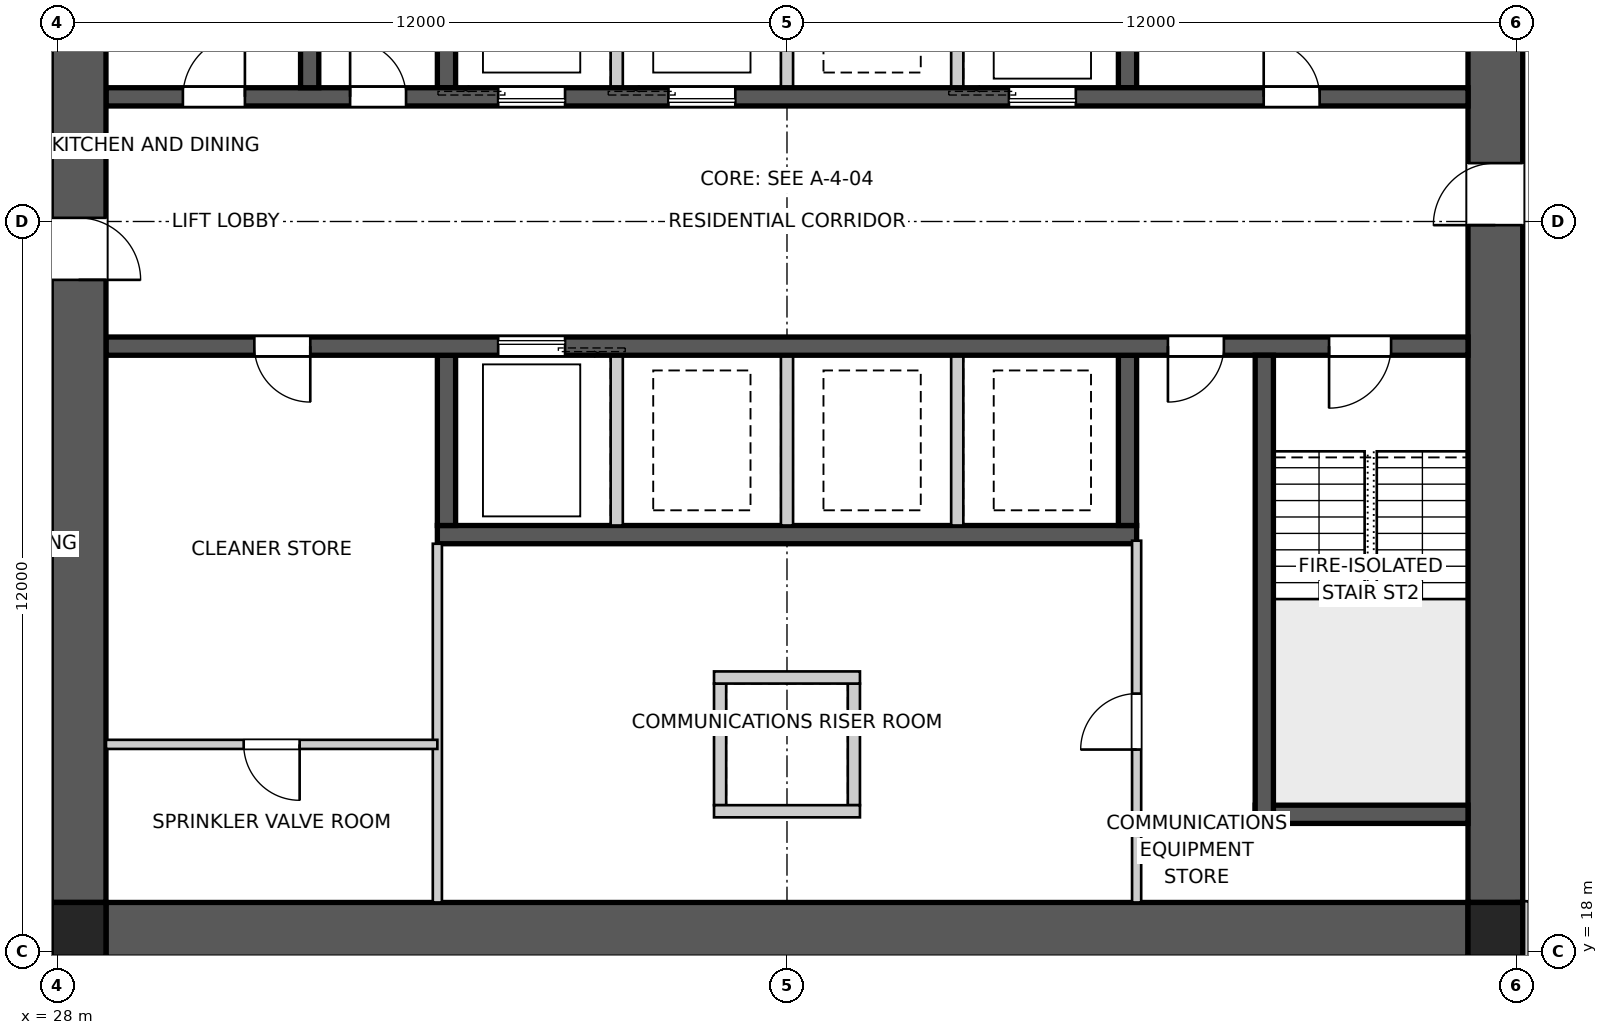
"""IFC4 building model, lengths in metres.
Left out: names, types, materials, properties, quantities, classifications, styles, units other than length and angle.
Written with IfcOpenShell. Run it as: python <this file> out.ifc"""

import sys

from ifc_helpers import new_model, si_unit, direction, frame, frame_2d, origin, origin_2d, place, context, subcontext, project, spatial, polyline, rectangle, outline, extrude, element, fill, save


model = new_model("IFC4")
c1 = context("Model", 3, precision=1e-05, world=origin(), true_north=direction((0.0, 1.0)))
c2 = subcontext(c1, "Body", "Model", "MODEL_VIEW")
j1 = project(units=[si_unit("LENGTHUNIT", "METRE"), si_unit("PLANEANGLEUNIT", "RADIAN")], contexts=[c1])
p1 = place(None, origin())
s1 = spatial("IfcSite", under=j1, at=p1, CompositionType="ELEMENT")
p2 = place(p1, origin())
s2 = spatial("IfcBuilding", under=s1, at=p2, CompositionType="ELEMENT")
p3 = place(p2, frame((0.0, 0.0, 32.0)))
s3 = spatial("IfcBuildingStorey", under=s2, at=p3, CompositionType="ELEMENT", Elevation=32.0)
p4 = place(p3, frame((51.2, 18.35, 0.0), z_axis=(0.0, 0.0, 1.0), x_axis=(-1.0, 0.0, 0.0)))
e1 = element("IfcWall", 1, at=p4, inside=s3, PredefinedType="SHEAR", context=c2, shape_type="SweptSolid", body=[
    extrude(outline(polyline([(0.0, -0.45), (22.4, -0.45), (22.4, -0.025), (22.85, -0.025), (22.85, 0.025), (22.4, 0.025), (22.4, 0.45), (0.0, 0.45), (0.0, 0.025), (-0.45, 0.025), (-0.45, -0.025), (0.0, -0.025), (0.0, -0.45)])), origin(), (0.0, 0.0, 1.0), 3.4),
])
p5 = place(p3, frame((51.65, 18.8, 0.0), z_axis=(0.0, 0.0, 1.0), x_axis=(0.0, 1.0, 0.0)))
e2 = element("IfcWall", 2, at=p5, inside=s3, PredefinedType="SHEAR", context=c2, shape_type="SweptSolid", body=[
    extrude(outline(polyline([(0.0, -0.45), (22.4, -0.45), (22.4, -0.025), (22.85, -0.025), (22.85, 0.025), (22.4, 0.025), (22.4, 0.45), (0.0, 0.45), (0.0, 0.025), (-0.45, 0.025), (-0.45, -0.025), (0.0, -0.025), (0.0, -0.45)])), origin(), (0.0, 0.0, 1.0), 3.4),
])
p6 = place(p5, frame((11.14, 0.0, 0.0)))
e3 = element("IfcOpeningElement", 3, at=p6, cuts=e2, PredefinedType="OPENING", context=c2, shape_type="SweptSolid", body=[
    extrude(rectangle(XDim=1.02, YDim=2.4, at=frame_2d((0.51, 1.2))), frame((0.0, 0.46, 0.0), z_axis=(0.0, -1.0, 0.0), x_axis=(1.0, 0.0, 0.0)), (0.0, 0.0, 1.0), 0.92),
])
p7 = place(p3, frame((28.35, 41.2, 0.0), z_axis=(0.0, 0.0, 1.0), x_axis=(0.0, -1.0, 0.0)))
e4 = element("IfcWall", 4, at=p7, inside=s3, PredefinedType="SHEAR", context=c2, shape_type="SweptSolid", body=[
    extrude(outline(polyline([(0.0, -0.45), (22.4, -0.45), (22.4, -0.025), (22.85, -0.025), (22.85, 0.025), (22.4, 0.025), (22.4, 0.45), (0.0, 0.45), (0.0, 0.025), (-0.45, 0.025), (-0.45, -0.025), (0.0, -0.025), (0.0, -0.45)])), origin(), (0.0, 0.0, 1.0), 3.4),
])
p8 = place(p7, frame((11.14, 0.0, 0.0)))
e5 = element("IfcOpeningElement", 5, at=p8, cuts=e4, PredefinedType="OPENING", context=c2, shape_type="SweptSolid", body=[
    extrude(rectangle(XDim=1.02, YDim=2.4, at=frame_2d((0.51, 1.2))), frame((0.0, 0.46, 0.0), z_axis=(0.0, -1.0, 0.0), x_axis=(1.0, 0.0, 0.0)), (0.0, 0.0, 1.0), 0.92),
])
p9 = place(p3, frame((28.8, 32.05, 0.0), z_axis=(0.0, 0.0, 1.0), x_axis=(1.0, 0.0, 0.0)))
e6 = element("IfcWall", 6, at=p9, inside=s3, PredefinedType="SHEAR", context=c2, shape_type="SweptSolid", body=[
    extrude(rectangle(XDim=22.4, YDim=0.3, at=frame_2d((11.2, 0.0))), origin(), (0.0, 0.0, 1.0), 3.4),
])
p10 = place(p9, frame((19.04, 0.0, 0.0)))
e7 = element("IfcOpeningElement", 7, at=p10, cuts=e6, PredefinedType="OPENING", context=c2, shape_type="SweptSolid", body=[
    extrude(rectangle(XDim=0.92, YDim=2.1, at=frame_2d((0.46, 1.05))), frame((0.0, 0.16, 0.0), z_axis=(0.0, -1.0, 0.0), x_axis=(1.0, 0.0, 0.0)), (0.0, 0.0, 1.0), 0.32),
])
p11 = place(p9, frame((1.265, 0.0, 0.0)))
e8 = element("IfcOpeningElement", 8, at=p11, cuts=e6, PredefinedType="OPENING", context=c2, shape_type="SweptSolid", body=[
    extrude(rectangle(XDim=1.02, YDim=2.1, at=frame_2d((0.51, 1.05))), frame((0.0, 0.16, 0.0), z_axis=(0.0, -1.0, 0.0), x_axis=(1.0, 0.0, 0.0)), (0.0, 0.0, 1.0), 0.32),
])
p12 = place(p9, frame((4.015, 0.0, 0.0)))
e9 = element("IfcOpeningElement", 9, at=p12, cuts=e6, PredefinedType="OPENING", context=c2, shape_type="SweptSolid", body=[
    extrude(rectangle(XDim=0.92, YDim=2.1, at=frame_2d((0.46, 1.05))), frame((0.0, 0.16, 0.0), z_axis=(0.0, -1.0, 0.0), x_axis=(1.0, 0.0, 0.0)), (0.0, 0.0, 1.0), 0.32),
])
p13 = place(p9, frame((6.45, 0.0, 0.0)))
e10 = element("IfcOpeningElement", 10, at=p13, cuts=e6, PredefinedType="OPENING", context=c2, shape_type="SweptSolid", body=[
    extrude(rectangle(XDim=1.1, YDim=2.1, at=frame_2d((0.55, 1.05))), frame((0.0, 0.16, 0.0), z_axis=(0.0, -1.0, 0.0), x_axis=(1.0, 0.0, 0.0)), (0.0, 0.0, 1.0), 0.32),
])
p14 = place(p9, frame((9.25, 0.0, 0.0)))
e11 = element("IfcOpeningElement", 11, at=p14, cuts=e6, PredefinedType="OPENING", context=c2, shape_type="SweptSolid", body=[
    extrude(rectangle(XDim=1.1, YDim=2.1, at=frame_2d((0.55, 1.05))), frame((0.0, 0.16, 0.0), z_axis=(0.0, -1.0, 0.0), x_axis=(1.0, 0.0, 0.0)), (0.0, 0.0, 1.0), 0.32),
])
p15 = place(p9, frame((14.85, 0.0, 0.0)))
e12 = element("IfcOpeningElement", 12, at=p15, cuts=e6, PredefinedType="OPENING", context=c2, shape_type="SweptSolid", body=[
    extrude(rectangle(XDim=1.1, YDim=2.1, at=frame_2d((0.55, 1.05))), frame((0.0, 0.16, 0.0), z_axis=(0.0, -1.0, 0.0), x_axis=(1.0, 0.0, 0.0)), (0.0, 0.0, 1.0), 0.32),
])
p16 = place(p3, frame((51.2, 27.95, 0.0), z_axis=(0.0, 0.0, 1.0), x_axis=(-1.0, 0.0, 0.0)))
e13 = element("IfcWall", 13, at=p16, inside=s3, PredefinedType="SHEAR", context=c2, shape_type="SweptSolid", body=[
    extrude(rectangle(XDim=22.4, YDim=0.3, at=frame_2d((11.2, 0.0))), origin(), (0.0, 0.0, 1.0), 3.4),
])
p17 = place(p16, frame((19.04, 0.0, 0.0)))
e14 = element("IfcOpeningElement", 14, at=p17, cuts=e13, PredefinedType="OPENING", context=c2, shape_type="SweptSolid", body=[
    extrude(rectangle(XDim=0.92, YDim=2.1, at=frame_2d((0.46, 1.05))), frame((0.0, 0.16, 0.0), z_axis=(0.0, -1.0, 0.0), x_axis=(1.0, 0.0, 0.0)), (0.0, 0.0, 1.0), 0.32),
])
p18 = place(p16, frame((1.265, 0.0, 0.0)))
e15 = element("IfcOpeningElement", 15, at=p18, cuts=e13, PredefinedType="OPENING", context=c2, shape_type="SweptSolid", body=[
    extrude(rectangle(XDim=1.02, YDim=2.1, at=frame_2d((0.51, 1.05))), frame((0.0, 0.16, 0.0), z_axis=(0.0, -1.0, 0.0), x_axis=(1.0, 0.0, 0.0)), (0.0, 0.0, 1.0), 0.32),
])
p19 = place(p16, frame((4.015, 0.0, 0.0)))
e16 = element("IfcOpeningElement", 16, at=p19, cuts=e13, PredefinedType="OPENING", context=c2, shape_type="SweptSolid", body=[
    extrude(rectangle(XDim=0.92, YDim=2.1, at=frame_2d((0.46, 1.05))), frame((0.0, 0.16, 0.0), z_axis=(0.0, -1.0, 0.0), x_axis=(1.0, 0.0, 0.0)), (0.0, 0.0, 1.0), 0.32),
])
p20 = place(p16, frame((14.85, 0.0, 0.0)))
e17 = element("IfcOpeningElement", 17, at=p20, cuts=e13, PredefinedType="OPENING", context=c2, shape_type="SweptSolid", body=[
    extrude(rectangle(XDim=1.1, YDim=2.1, at=frame_2d((0.55, 1.05))), frame((0.0, 0.16, 0.0), z_axis=(0.0, -1.0, 0.0), x_axis=(1.0, 0.0, 0.0)), (0.0, 0.0, 1.0), 0.32),
])
p21 = place(p3, frame((45.75, 24.85, 0.0), z_axis=(0.0, 0.0, 1.0), x_axis=(-1.0, 0.0, 0.0)))
e18 = element("IfcWall", 18, at=p21, inside=s3, PredefinedType="SHEAR", context=c2, shape_type="SweptSolid", body=[
    extrude(rectangle(XDim=11.5, YDim=0.3, at=frame_2d((5.75, 0.0))), origin(), (0.0, 0.0, 1.0), 3.4),
])
for number, where, z_axis, x_axis in (
    (19, (34.4, 32.2, 0.0), (0.0, 0.0, 1.0), (0.0, 1.0, 0.0)),
    (20, (45.6, 27.8, 0.0), (0.0, 0.0, 1.0), (0.0, -1.0, 0.0)),
):
    element("IfcWall", number, at=place(p3, frame(where, z_axis=z_axis, x_axis=x_axis)), inside=s3, PredefinedType="SHEAR", context=c2, shape_type="SweptSolid", body=[
        extrude(rectangle(XDim=2.8, YDim=0.3, at=frame_2d((1.4, 0.0))), origin(), (0.0, 0.0, 1.0), 3.4),
    ])
for number, where, z_axis, x_axis in (
    (21, (37.2, 32.2, 0.0), (0.0, 0.0, 1.0), (0.0, 1.0, 0.0)),
    (22, (42.8, 27.8, 0.0), (0.0, 0.0, 1.0), (0.0, -1.0, 0.0)),
    (23, (40.0, 32.2, 0.0), (0.0, 0.0, 1.0), (0.0, 1.0, 0.0)),
    (24, (40.0, 27.8, 0.0), (0.0, 0.0, 1.0), (0.0, -1.0, 0.0)),
    (25, (42.8, 32.2, 0.0), (0.0, 0.0, 1.0), (0.0, 1.0, 0.0)),
    (26, (37.2, 27.8, 0.0), (0.0, 0.0, 1.0), (0.0, -1.0, 0.0)),
):
    element("IfcWall", number, at=place(p3, frame(where, z_axis=z_axis, x_axis=x_axis)), inside=s3, PredefinedType="SOLIDWALL", context=c2, shape_type="SweptSolid", body=[
        extrude(rectangle(XDim=2.8, YDim=0.2, at=frame_2d((1.4, 0.0))), origin(), (0.0, 0.0, 1.0), 3.4),
    ])
for number, where, z_axis, x_axis in (
    (27, (45.6, 32.2, 0.0), (0.0, 0.0, 1.0), (0.0, 1.0, 0.0)),
    (28, (34.4, 27.8, 0.0), (0.0, 0.0, 1.0), (0.0, -1.0, 0.0)),
):
    element("IfcWall", number, at=place(p3, frame(where, z_axis=z_axis, x_axis=x_axis)), inside=s3, PredefinedType="SHEAR", context=c2, shape_type="SweptSolid", body=[
        extrude(rectangle(XDim=2.8, YDim=0.3, at=frame_2d((1.4, 0.0))), origin(), (0.0, 0.0, 1.0), 3.4),
    ])
for number, where, z_axis, x_axis in (
    (29, (32.15, 32.2, 0.0), (0.0, 0.0, 1.0), (0.0, 1.0, 0.0)),
    (30, (47.85, 27.8, 0.0), (0.0, 0.0, 1.0), (0.0, -1.0, 0.0)),
):
    element("IfcWall", number, at=place(p3, frame(where, z_axis=z_axis, x_axis=x_axis)), inside=s3, PredefinedType="SHEAR", context=c2, shape_type="SweptSolid", body=[
        extrude(rectangle(XDim=7.7, YDim=0.3, at=frame_2d((3.85, 0.0))), origin(), (0.0, 0.0, 1.0), 3.4),
    ])
p22 = place(p3, frame((51.2, 20.25, 0.0), z_axis=(0.0, 0.0, 1.0), x_axis=(-1.0, 0.0, 0.0)))
e31 = element("IfcWall", 31, at=p22, inside=s3, PredefinedType="SHEAR", context=c2, shape_type="SweptSolid", body=[
    extrude(rectangle(XDim=3.5, YDim=0.3, at=frame_2d((1.75, 0.0))), origin(), (0.0, 0.0, 1.0), 3.4),
])
for number, where, z_axis, x_axis in (
    (32, (38.9, 22.4, 0.0), (0.0, 0.0, 1.0), (0.0, -1.0, 0.0)),
    (33, (41.1, 22.4, 0.0), (0.0, 0.0, 1.0), (0.0, -1.0, 0.0)),
):
    element("IfcWall", number, at=place(p3, frame(where, z_axis=z_axis, x_axis=x_axis)), inside=s3, PredefinedType="SOLIDWALL", context=c2, shape_type="SweptSolid", body=[
        extrude(rectangle(XDim=2.0, YDim=0.2, at=frame_2d((1.0, 0.0))), origin(), (0.0, 0.0, 1.0), 3.4),
    ])
for number, where, z_axis, x_axis in (
    (34, (38.8, 22.5, 0.0), (0.0, 0.0, 1.0), (1.0, 0.0, 0.0)),
    (35, (38.8, 20.3, 0.0), (0.0, 0.0, 1.0), (1.0, 0.0, 0.0)),
):
    element("IfcWall", number, at=place(p3, frame(where, z_axis=z_axis, x_axis=x_axis)), inside=s3, PredefinedType="SOLIDWALL", context=c2, shape_type="SweptSolid", body=[
        extrude(rectangle(XDim=2.4, YDim=0.2, at=frame_2d((1.2, 0.0))), origin(), (0.0, 0.0, 1.0), 3.4),
    ])
for number, where, z_axis, x_axis in (
    (36, (28.35, 18.35, 0.0), (0.0, 0.0, 1.0), (1.0, 0.0, 0.0)),
    (37, (51.65, 18.35, 0.0), (0.0, 0.0, 1.0), (1.0, 0.0, 0.0)),
):
    element("IfcColumn", number, at=place(p3, frame(where, z_axis=z_axis, x_axis=x_axis)), inside=s3, PredefinedType="COLUMN", context=c2, shape_type="SweptSolid", body=[
        extrude(rectangle(XDim=0.9, YDim=0.9, at=origin_2d()), origin(), (0.0, 0.0, 1.0), 3.4),
    ])
p23 = place(p3, frame((45.75, 18.8, 0.0), z_axis=(0.0, 0.0, 1.0), x_axis=(0.0, 1.0, 0.0)))
e38 = element("IfcWall", 38, at=p23, inside=s3, PredefinedType="SOLIDWALL", context=c2, shape_type="SweptSolid", body=[
    extrude(rectangle(XDim=5.95, YDim=0.15, at=frame_2d((2.975, 0.0))), origin(), (0.0, 0.0, 1.0), 3.25),
])
p24 = place(p23, frame((2.515, 0.0, 0.0)))
e39 = element("IfcOpeningElement", 39, at=p24, cuts=e38, PredefinedType="OPENING", context=c2, shape_type="SweptSolid", body=[
    extrude(rectangle(XDim=0.92, YDim=2.1, at=frame_2d((0.46, 1.05))), frame((0.0, 0.085, 0.0), z_axis=(0.0, -1.0, 0.0), x_axis=(1.0, 0.0, 0.0)), (0.0, 0.0, 1.0), 0.17),
])
p25 = place(p3, frame((34.25, 18.8, 0.0), z_axis=(0.0, 0.0, 1.0), x_axis=(0.0, 1.0, 0.0)))
e40 = element("IfcWall", 40, at=p25, inside=s3, PredefinedType="SOLIDWALL", context=c2, shape_type="SweptSolid", body=[
    extrude(rectangle(XDim=5.9, YDim=0.15, at=frame_2d((2.95, 0.0))), origin(), (0.0, 0.0, 1.0), 3.25),
])
p26 = place(p3, frame((34.25, 21.4, 0.0), z_axis=(0.0, 0.0, 1.0), x_axis=(-1.0, 0.0, 0.0)))
e41 = element("IfcWall", 41, at=p26, inside=s3, PredefinedType="SOLIDWALL", context=c2, shape_type="SweptSolid", body=[
    extrude(rectangle(XDim=5.45, YDim=0.15, at=frame_2d((2.725, 0.0))), origin(), (0.0, 0.0, 1.0), 3.25),
])
p27 = place(p26, frame((2.265, 0.0, 0.0)))
e42 = element("IfcOpeningElement", 42, at=p27, cuts=e41, PredefinedType="OPENING", context=c2, shape_type="SweptSolid", body=[
    extrude(rectangle(XDim=0.92, YDim=2.1, at=frame_2d((0.46, 1.05))), frame((0.0, 0.085, 0.0), z_axis=(0.0, -1.0, 0.0), x_axis=(1.0, 0.0, 0.0)), (0.0, 0.0, 1.0), 0.17),
])
p28 = place(p3, frame((27.9, 17.95, 0.0), z_axis=(0.0, 0.0, 1.0), x_axis=(0.0, -1.0, 0.0)))
e43 = element("IfcWall", 43, at=p28, inside=s3, PredefinedType="PARTITIONING", context=c2, shape_type="SweptSolid", body=[
    extrude(rectangle(XDim=2.1, YDim=0.2, at=frame_2d((1.05, 0.0))), origin(), (0.0, 0.0, 1.0), 3.25),
])
p29 = place(p3, frame((52.1, 15.85, 0.0), z_axis=(0.0, 0.0, 1.0), x_axis=(0.0, 1.0, 0.0)))
e44 = element("IfcWall", 44, at=p29, inside=s3, PredefinedType="PARTITIONING", context=c2, shape_type="SweptSolid", body=[
    extrude(rectangle(XDim=2.97, YDim=0.2, at=frame_2d((1.485, 0.0))), origin(), (0.0, 0.0, 1.0), 3.25),
])
p30 = place(p10, origin())
e45 = element("IfcDoor", 45, at=p30, inside=s3, OperationType="SINGLE_SWING_LEFT", PredefinedType="DOOR", context=c2, shape_type="SweptSolid", body=[
    extrude(rectangle(XDim=0.92, YDim=2.1, at=frame_2d((0.46, 1.05))), frame((0.0, 0.025, 0.0), z_axis=(0.0, -1.0, 0.0), x_axis=(1.0, 0.0, 0.0)), (0.0, 0.0, 1.0), 0.05),
])
fill(e7, e45)
p31 = place(p17, origin())
e46 = element("IfcDoor", 46, at=p31, inside=s3, OperationType="SINGLE_SWING_LEFT", PredefinedType="DOOR", context=c2, shape_type="SweptSolid", body=[
    extrude(rectangle(XDim=0.92, YDim=2.1, at=frame_2d((0.46, 1.05))), frame((0.0, 0.025, 0.0), z_axis=(0.0, -1.0, 0.0), x_axis=(1.0, 0.0, 0.0)), (0.0, 0.0, 1.0), 0.05),
])
fill(e14, e46)
p32 = place(p18, origin())
e47 = element("IfcDoor", 47, at=p32, inside=s3, OperationType="SINGLE_SWING_RIGHT", PredefinedType="DOOR", context=c2, shape_type="SweptSolid", body=[
    extrude(rectangle(XDim=1.02, YDim=2.1, at=frame_2d((0.51, 1.05))), frame((0.0, 0.025, 0.0), z_axis=(0.0, -1.0, 0.0), x_axis=(1.0, 0.0, 0.0)), (0.0, 0.0, 1.0), 0.05),
])
fill(e15, e47)
p33 = place(p11, origin())
e48 = element("IfcDoor", 48, at=p33, inside=s3, OperationType="SINGLE_SWING_RIGHT", PredefinedType="DOOR", context=c2, shape_type="SweptSolid", body=[
    extrude(rectangle(XDim=1.02, YDim=2.1, at=frame_2d((0.51, 1.05))), frame((0.0, 0.025, 0.0), z_axis=(0.0, -1.0, 0.0), x_axis=(1.0, 0.0, 0.0)), (0.0, 0.0, 1.0), 0.05),
])
fill(e8, e48)
p34 = place(p12, origin())
e49 = element("IfcDoor", 49, at=p34, inside=s3, OperationType="SINGLE_SWING_LEFT", PredefinedType="DOOR", context=c2, shape_type="SweptSolid", body=[
    extrude(rectangle(XDim=0.92, YDim=2.1, at=frame_2d((0.46, 1.05))), frame((0.0, 0.025, 0.0), z_axis=(0.0, -1.0, 0.0), x_axis=(1.0, 0.0, 0.0)), (0.0, 0.0, 1.0), 0.05),
])
fill(e9, e49)
p35 = place(p19, origin())
e50 = element("IfcDoor", 50, at=p35, inside=s3, OperationType="SINGLE_SWING_RIGHT", PredefinedType="DOOR", context=c2, shape_type="SweptSolid", body=[
    extrude(rectangle(XDim=0.92, YDim=2.1, at=frame_2d((0.46, 1.05))), frame((0.0, 0.025, 0.0), z_axis=(0.0, -1.0, 0.0), x_axis=(1.0, 0.0, 0.0)), (0.0, 0.0, 1.0), 0.05),
])
fill(e16, e50)
p36 = place(p27, origin())
e51 = element("IfcDoor", 51, at=p36, inside=s3, OperationType="SINGLE_SWING_LEFT", PredefinedType="DOOR", context=c2, shape_type="SweptSolid", body=[
    extrude(rectangle(XDim=0.92, YDim=2.1, at=frame_2d((0.46, 1.05))), frame((0.0, 0.025, 0.0), z_axis=(0.0, -1.0, 0.0), x_axis=(1.0, 0.0, 0.0)), (0.0, 0.0, 1.0), 0.05),
])
fill(e42, e51)
p37 = place(p24, origin())
e52 = element("IfcDoor", 52, at=p37, inside=s3, OperationType="SINGLE_SWING_LEFT", PredefinedType="DOOR", context=c2, shape_type="SweptSolid", body=[
    extrude(rectangle(XDim=0.92, YDim=2.1, at=frame_2d((0.46, 1.05))), frame((0.0, 0.025, 0.0), z_axis=(0.0, -1.0, 0.0), x_axis=(1.0, 0.0, 0.0)), (0.0, 0.0, 1.0), 0.05),
])
fill(e39, e52)
p38 = place(p6, origin())
e53 = element("IfcDoor", 53, at=p38, inside=s3, OperationType="SINGLE_SWING_LEFT", PredefinedType="DOOR", context=c2, shape_type="SweptSolid", body=[
    extrude(rectangle(XDim=1.02, YDim=2.4, at=frame_2d((0.51, 1.2))), frame((0.0, 0.025, 0.0), z_axis=(0.0, -1.0, 0.0), x_axis=(1.0, 0.0, 0.0)), (0.0, 0.0, 1.0), 0.05),
])
fill(e3, e53)
p39 = place(p8, origin())
e54 = element("IfcDoor", 54, at=p39, inside=s3, OperationType="SINGLE_SWING_RIGHT", PredefinedType="DOOR", context=c2, shape_type="SweptSolid", body=[
    extrude(rectangle(XDim=1.02, YDim=2.4, at=frame_2d((0.51, 1.2))), frame((0.0, 0.025, 0.0), z_axis=(0.0, -1.0, 0.0), x_axis=(1.0, 0.0, 0.0)), (0.0, 0.0, 1.0), 0.05),
])
fill(e5, e54)
p40 = place(p13, origin())
e55 = element("IfcDoor", 55, at=p40, inside=s3, OperationType="SLIDING_TO_LEFT", PredefinedType="DOOR", context=c2, shape_type="SweptSolid", body=[
    extrude(rectangle(XDim=1.1, YDim=2.1, at=frame_2d((0.55, 1.05))), frame((0.0, 0.025, 0.0), z_axis=(0.0, -1.0, 0.0), x_axis=(1.0, 0.0, 0.0)), (0.0, 0.0, 1.0), 0.05),
])
fill(e10, e55)
p41 = place(p14, origin())
e56 = element("IfcDoor", 56, at=p41, inside=s3, OperationType="SLIDING_TO_LEFT", PredefinedType="DOOR", context=c2, shape_type="SweptSolid", body=[
    extrude(rectangle(XDim=1.1, YDim=2.1, at=frame_2d((0.55, 1.05))), frame((0.0, 0.025, 0.0), z_axis=(0.0, -1.0, 0.0), x_axis=(1.0, 0.0, 0.0)), (0.0, 0.0, 1.0), 0.05),
])
fill(e11, e56)
p42 = place(p15, origin())
e57 = element("IfcDoor", 57, at=p42, inside=s3, OperationType="SLIDING_TO_LEFT", PredefinedType="DOOR", context=c2, shape_type="SweptSolid", body=[
    extrude(rectangle(XDim=1.1, YDim=2.1, at=frame_2d((0.55, 1.05))), frame((0.0, 0.025, 0.0), z_axis=(0.0, -1.0, 0.0), x_axis=(1.0, 0.0, 0.0)), (0.0, 0.0, 1.0), 0.05),
])
fill(e12, e57)
p43 = place(p20, origin())
e58 = element("IfcDoor", 58, at=p43, inside=s3, OperationType="SLIDING_TO_LEFT", PredefinedType="DOOR", context=c2, shape_type="SweptSolid", body=[
    extrude(rectangle(XDim=1.1, YDim=2.1, at=frame_2d((0.55, 1.05))), frame((0.0, 0.025, 0.0), z_axis=(0.0, -1.0, 0.0), x_axis=(1.0, 0.0, 0.0)), (0.0, 0.0, 1.0), 0.05),
])
fill(e17, e58)
save(model, sys.argv[1])
